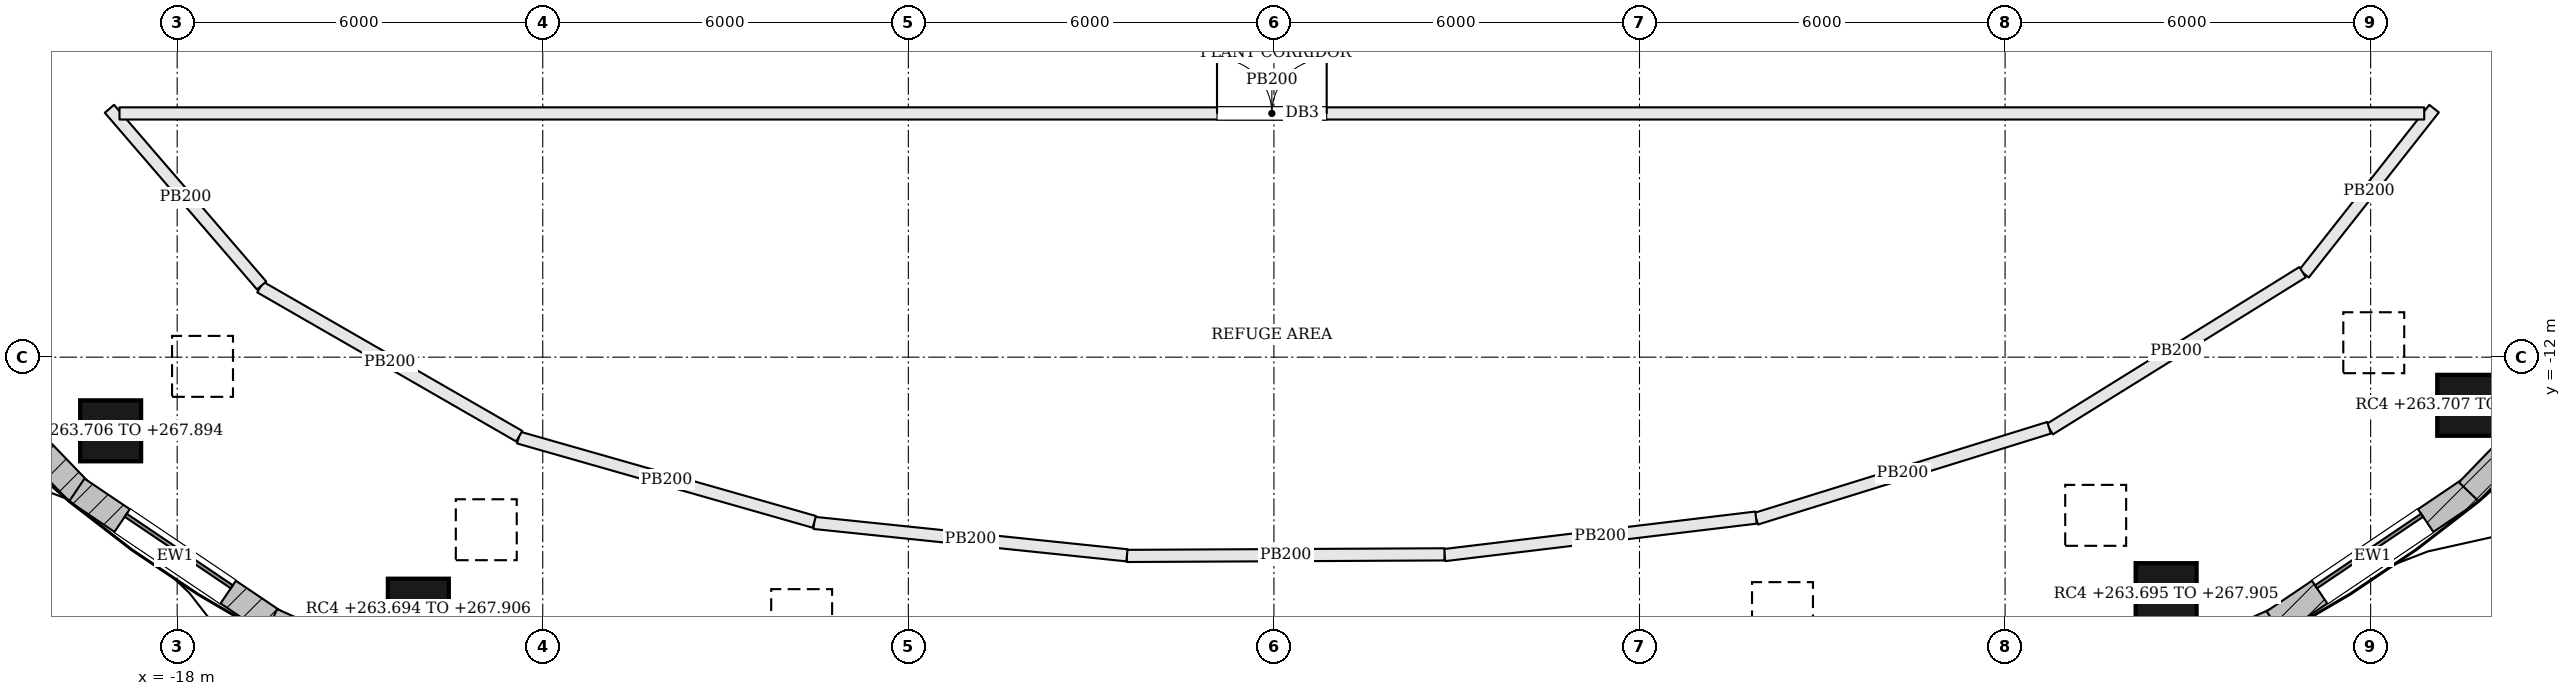
"""IFC4 building model, lengths in metres.
Left out: names, types, materials, properties, quantities, classifications, styles, units other than length and angle.
Written with IfcOpenShell. Run it as: python <this file> out.ifc"""

import sys

from ifc_helpers import new_model, si_unit, direction, frame, frame_2d, origin, origin_2d, place, context, subcontext, project, spatial, rectangle, extrude, element, fill, save


model = new_model("IFC4")
c1 = context("Model", 3, precision=1e-05, world=origin(), true_north=direction((0.0, 1.0)))
c2 = subcontext(c1, "Body", "Model", "MODEL_VIEW")
j1 = project(units=[si_unit("LENGTHUNIT", "METRE"), si_unit("PLANEANGLEUNIT", "RADIAN")], contexts=[c1])
p1 = place(None, origin())
s1 = spatial("IfcSite", under=j1, at=p1, CompositionType="ELEMENT")
p2 = place(p1, origin())
s2 = spatial("IfcBuilding", under=s1, at=p2, CompositionType="ELEMENT")
p3 = place(p2, frame((0.0, 0.0, 264.3)))
s3 = spatial("IfcBuildingStorey", under=s2, at=p3, CompositionType="ELEMENT", Elevation=264.3)
p4 = place(p3, frame((-19.092, -13.209, -0.594), z_axis=(0.329610632582, 0.231266388475, 0.915353859691), x_axis=(-0.574360318683, 0.818602604639, 0.0)))
e1 = element("IfcColumn", 1, at=p4, inside=s3, PredefinedType="COLUMN", context=c2, shape_type="SweptSolid", body=[
    extrude(rectangle(XDim=1.0, YDim=1.0, at=origin_2d()), origin(), (0.0, 0.0, 1.0), 4.575),
])
p5 = place(p3, frame((-14.042, -16.136, -0.606), z_axis=(0.245164009976, 0.286713592573, 0.926115502541), x_axis=(-0.760029513811, 0.649888558243, 0.0)))
e2 = element("IfcColumn", 2, at=p5, inside=s3, PredefinedType="COLUMN", context=c2, shape_type="SweptSolid", body=[
    extrude(rectangle(XDim=1.0, YDim=1.0, at=origin_2d()), origin(), (0.0, 0.0, 1.0), 4.548),
])
p6 = place(p3, frame((-8.422, -17.749, -0.619), z_axis=(0.148262587168, 0.318583885924, 0.936227810352), x_axis=(-0.906629641713, 0.421927354845, 0.0)))
e3 = element("IfcColumn", 3, at=p6, inside=s3, PredefinedType="COLUMN", context=c2, shape_type="SweptSolid", body=[
    extrude(rectangle(XDim=1.0, YDim=1.0, at=origin_2d()), origin(), (0.0, 0.0, 1.0), 4.527),
])
p7 = place(p3, frame((9.063, -17.625, -0.618), z_axis=(-0.158109970508, 0.316435570024, 0.93534473177), x_axis=(-0.89454907246, -0.446969749493, 0.0)))
e4 = element("IfcColumn", 4, at=p7, inside=s3, PredefinedType="COLUMN", context=c2, shape_type="SweptSolid", body=[
    extrude(rectangle(XDim=1.0, YDim=1.0, at=origin_2d()), origin(), (0.0, 0.0, 1.0), 4.529),
])
p8 = place(p3, frame((14.643, -15.881, -0.605), z_axis=(-0.254010498473, 0.282388862505, 0.925059564027), x_axis=(-0.743476713513, -0.66876182342, 0.0)))
e5 = element("IfcColumn", 5, at=p8, inside=s3, PredefinedType="COLUMN", context=c2, shape_type="SweptSolid", body=[
    extrude(rectangle(XDim=1.0, YDim=1.0, at=origin_2d()), origin(), (0.0, 0.0, 1.0), 4.551),
])
p9 = place(p3, frame((19.593, -12.79, -0.593), z_axis=(-0.336846855875, 0.224369018789, 0.914435749025), x_axis=(-0.554365652735, -0.832273226211, 0.0)))
e6 = element("IfcColumn", 6, at=p9, inside=s3, PredefinedType="COLUMN", context=c2, shape_type="SweptSolid", body=[
    extrude(rectangle(XDim=1.0, YDim=1.0, at=origin_2d()), origin(), (0.0, 0.0, 1.0), 4.578),
])
p10 = place(p3, frame((-22.386, -11.333, 0.0), z_axis=(0.0, 0.0, 1.0), x_axis=(0.694225992979, -0.719757091436, 0.0)))
e7 = element("IfcWall", 7, at=p10, inside=s3, PredefinedType="SOLIDWALL", context=c2, shape_type="SweptSolid", body=[
    extrude(rectangle(XDim=3.997, YDim=0.45, at=frame_2d((1.999, 0.0))), origin(), (0.0, 0.0, 1.0), 4.3),
])
p11 = place(p10, frame((0.948, 0.0, 1.2)))
e8 = element("IfcOpeningElement", 8, at=p11, cuts=e7, PredefinedType="OPENING", context=c2, shape_type="SweptSolid", body=[
    extrude(rectangle(XDim=2.1, YDim=1.8, at=frame_2d((1.05, 0.9))), frame((0.0, 0.235, 0.0), z_axis=(0.0, -1.0, 0.0), x_axis=(1.0, 0.0, 0.0)), (0.0, 0.0, 1.0), 0.47),
])
p12 = place(p3, frame((-19.647, -14.179, 0.0), z_axis=(0.0, 0.0, 1.0), x_axis=(0.829039015156, -0.559190764721, 0.0)))
e9 = element("IfcWall", 9, at=p12, inside=s3, PredefinedType="SOLIDWALL", context=c2, shape_type="SweptSolid", body=[
    extrude(rectangle(XDim=3.895, YDim=0.45, at=frame_2d((1.947, 0.0))), origin(), (0.0, 0.0, 1.0), 4.3),
])
p13 = place(p12, frame((0.897, 0.0, 1.2)))
e10 = element("IfcOpeningElement", 10, at=p13, cuts=e9, PredefinedType="OPENING", context=c2, shape_type="SweptSolid", body=[
    extrude(rectangle(XDim=2.1, YDim=1.8, at=frame_2d((1.05, 0.9))), frame((0.0, 0.235, 0.0), z_axis=(0.0, -1.0, 0.0), x_axis=(1.0, 0.0, 0.0)), (0.0, 0.0, 1.0), 0.47),
])
p14 = place(p3, frame((-16.452, -16.339, 0.0), z_axis=(0.0, 0.0, 1.0), x_axis=(0.912495881005, -0.409085892142, 0.0)))
e11 = element("IfcWall", 11, at=p14, inside=s3, PredefinedType="SOLIDWALL", context=c2, shape_type="SweptSolid", body=[
    extrude(rectangle(XDim=3.74, YDim=0.45, at=frame_2d((1.87, 0.0))), origin(), (0.0, 0.0, 1.0), 4.3),
])
p15 = place(p14, frame((0.82, 0.0, 1.2)))
e12 = element("IfcOpeningElement", 12, at=p15, cuts=e11, PredefinedType="OPENING", context=c2, shape_type="SweptSolid", body=[
    extrude(rectangle(XDim=2.1, YDim=1.8, at=frame_2d((1.05, 0.9))), frame((0.0, 0.235, 0.0), z_axis=(0.0, -1.0, 0.0), x_axis=(1.0, 0.0, 0.0)), (0.0, 0.0, 1.0), 0.47),
])
p16 = place(p3, frame((13.039, -17.869, 0.0), z_axis=(0.0, 0.0, 1.0), x_axis=(0.912495881005, 0.409085892142, 0.0)))
e13 = element("IfcWall", 13, at=p16, inside=s3, PredefinedType="SOLIDWALL", context=c2, shape_type="SweptSolid", body=[
    extrude(rectangle(XDim=3.74, YDim=0.45, at=frame_2d((1.87, 0.0))), origin(), (0.0, 0.0, 1.0), 4.3),
])
p17 = place(p16, frame((0.82, 0.0, 1.2)))
e14 = element("IfcOpeningElement", 14, at=p17, cuts=e13, PredefinedType="OPENING", context=c2, shape_type="SweptSolid", body=[
    extrude(rectangle(XDim=2.1, YDim=1.8, at=frame_2d((1.05, 0.9))), frame((0.0, 0.235, 0.0), z_axis=(0.0, -1.0, 0.0), x_axis=(1.0, 0.0, 0.0)), (0.0, 0.0, 1.0), 0.47),
])
p18 = place(p3, frame((16.418, -16.357, 0.0), z_axis=(0.0, 0.0, 1.0), x_axis=(0.829039015156, 0.559190764721, 0.0)))
e15 = element("IfcWall", 15, at=p18, inside=s3, PredefinedType="SOLIDWALL", context=c2, shape_type="SweptSolid", body=[
    extrude(rectangle(XDim=3.895, YDim=0.45, at=frame_2d((1.947, 0.0))), origin(), (0.0, 0.0, 1.0), 4.3),
])
p19 = place(p18, frame((0.897, 0.0, 1.2)))
e16 = element("IfcOpeningElement", 16, at=p19, cuts=e15, PredefinedType="OPENING", context=c2, shape_type="SweptSolid", body=[
    extrude(rectangle(XDim=2.1, YDim=1.8, at=frame_2d((1.05, 0.9))), frame((0.0, 0.235, 0.0), z_axis=(0.0, -1.0, 0.0), x_axis=(1.0, 0.0, 0.0)), (0.0, 0.0, 1.0), 0.47),
])
p20 = place(p3, frame((19.611, -14.21, 0.0), z_axis=(0.0, 0.0, 1.0), x_axis=(0.694225992979, 0.719757091436, 0.0)))
e17 = element("IfcWall", 17, at=p20, inside=s3, PredefinedType="SOLIDWALL", context=c2, shape_type="SweptSolid", body=[
    extrude(rectangle(XDim=3.997, YDim=0.45, at=frame_2d((1.999, 0.0))), origin(), (0.0, 0.0, 1.0), 4.3),
])
p21 = place(p20, frame((0.948, 0.0, 1.2)))
e18 = element("IfcOpeningElement", 18, at=p21, cuts=e17, PredefinedType="OPENING", context=c2, shape_type="SweptSolid", body=[
    extrude(rectangle(XDim=2.1, YDim=1.8, at=frame_2d((1.05, 0.9))), frame((0.0, 0.235, 0.0), z_axis=(0.0, -1.0, 0.0), x_axis=(1.0, 0.0, 0.0)), (0.0, 0.0, 1.0), 0.47),
])
p22 = place(p3, frame((19.041, -7.921, 0.0), z_axis=(0.0, 0.0, 1.0), x_axis=(-0.618817980567, -0.785534408493, 0.0)))
e19 = element("IfcWall", 19, at=p22, inside=s3, PredefinedType="PARTITIONING", context=c2, shape_type="SweptSolid", body=[
    extrude(rectangle(XDim=3.45, YDim=0.2, at=frame_2d((1.725, 0.0))), origin(), (0.0, 0.0, 1.0), 4.3),
])
p23 = place(p3, frame((16.883, -10.605, 0.0), z_axis=(0.0, 0.0, 1.0), x_axis=(-0.849608511022, -0.527413858368, 0.0)))
e20 = element("IfcWall", 20, at=p23, inside=s3, PredefinedType="PARTITIONING", context=c2, shape_type="SweptSolid", body=[
    extrude(rectangle(XDim=4.886, YDim=0.2, at=frame_2d((2.443, 0.0))), origin(), (0.0, 0.0, 1.0), 4.3),
])
p24 = place(p3, frame((12.721, -13.159, 0.0), z_axis=(0.0, 0.0, 1.0), x_axis=(-0.955038559717, -0.296481617396, 0.0)))
e21 = element("IfcWall", 21, at=p24, inside=s3, PredefinedType="PARTITIONING", context=c2, shape_type="SweptSolid", body=[
    extrude(rectangle(XDim=5.032, YDim=0.2, at=frame_2d((2.516, 0.0))), origin(), (0.0, 0.0, 1.0), 4.3),
])
p25 = place(p3, frame((7.912, -14.633, 0.0), z_axis=(0.0, 0.0, 1.0), x_axis=(-0.992841344803, -0.119440629808, 0.0)))
e22 = element("IfcWall", 22, at=p25, inside=s3, PredefinedType="PARTITIONING", context=c2, shape_type="SweptSolid", body=[
    extrude(rectangle(XDim=5.149, YDim=0.2, at=frame_2d((2.574, 0.0))), origin(), (0.0, 0.0, 1.0), 4.3),
])
p26 = place(p3, frame((2.799, -15.236, 0.0), z_axis=(0.0, 0.0, 1.0), x_axis=(-0.9999876741, -0.004965042553, 0.0)))
e23 = element("IfcWall", 23, at=p26, inside=s3, PredefinedType="PARTITIONING", context=c2, shape_type="SweptSolid", body=[
    extrude(rectangle(XDim=5.212, YDim=0.2, at=frame_2d((2.606, 0.0))), origin(), (0.0, 0.0, 1.0), 4.3),
])
p27 = place(p3, frame((-2.412, -15.252, 0.0), z_axis=(0.0, 0.0, 1.0), x_axis=(-0.994673915242, 0.103071830955, 0.0)))
e24 = element("IfcWall", 24, at=p27, inside=s3, PredefinedType="PARTITIONING", context=c2, shape_type="SweptSolid", body=[
    extrude(rectangle(XDim=5.161, YDim=0.2, at=frame_2d((2.581, 0.0))), origin(), (0.0, 0.0, 1.0), 4.3),
])
p28 = place(p3, frame((-7.543, -14.703, 0.0), z_axis=(0.0, 0.0, 1.0), x_axis=(-0.961706339668, 0.27408195169, 0.0)))
e25 = element("IfcWall", 25, at=p28, inside=s3, PredefinedType="PARTITIONING", context=c2, shape_type="SweptSolid", body=[
    extrude(rectangle(XDim=5.045, YDim=0.2, at=frame_2d((2.522, 0.0))), origin(), (0.0, 0.0, 1.0), 4.3),
])
p29 = place(p3, frame((-12.386, -13.297, 0.0), z_axis=(0.0, 0.0, 1.0), x_axis=(-0.866617890559, 0.498972375751, 0.0)))
e26 = element("IfcWall", 26, at=p29, inside=s3, PredefinedType="PARTITIONING", context=c2, shape_type="SweptSolid", body=[
    extrude(rectangle(XDim=4.904, YDim=0.2, at=frame_2d((2.452, 0.0))), origin(), (0.0, 0.0, 1.0), 4.3),
])
p30 = place(p3, frame((-16.614, -10.824, 0.0), z_axis=(0.0, 0.0, 1.0), x_axis=(-0.652659458067, 0.757651391998, 0.0)))
e27 = element("IfcWall", 27, at=p30, inside=s3, PredefinedType="PARTITIONING", context=c2, shape_type="SweptSolid", body=[
    extrude(rectangle(XDim=3.827, YDim=0.2, at=frame_2d((1.914, 0.0))), origin(), (0.0, 0.0, 1.0), 4.3),
])
p31 = place(p3, frame((-18.947, -8.0, 0.0), z_axis=(0.0, 0.0, 1.0), x_axis=(1.0, 0.0, 0.0)))
e28 = element("IfcWall", 28, at=p31, inside=s3, PredefinedType="PARTITIONING", context=c2, shape_type="SweptSolid", body=[
    extrude(rectangle(XDim=37.826, YDim=0.2, at=frame_2d((18.913, 0.0))), origin(), (0.0, 0.0, 1.0), 4.3),
])
p32 = place(p31, frame((18.013, 0.0, 0.0)))
e29 = element("IfcOpeningElement", 29, at=p32, cuts=e28, PredefinedType="OPENING", context=c2, shape_type="SweptSolid", body=[
    extrude(rectangle(XDim=1.8, YDim=2.1, at=frame_2d((0.9, 1.05))), frame((0.0, 0.11, 0.0), z_axis=(0.0, -1.0, 0.0), x_axis=(1.0, 0.0, 0.0)), (0.0, 0.0, 1.0), 0.22),
])
p33 = place(p13, origin())
e30 = element("IfcWindow", 30, at=p33, inside=s3, PartitioningType="SINGLE_PANEL", PredefinedType="WINDOW", context=c2, shape_type="SweptSolid", body=[
    extrude(rectangle(XDim=2.1, YDim=1.8, at=frame_2d((1.05, 0.9))), frame((0.0, 0.135, 0.0), z_axis=(0.0, -1.0, 0.0), x_axis=(1.0, 0.0, 0.0)), (0.0, 0.0, 1.0), 0.06),
])
fill(e10, e30)
p34 = place(p19, origin())
e31 = element("IfcWindow", 31, at=p34, inside=s3, PartitioningType="SINGLE_PANEL", PredefinedType="WINDOW", context=c2, shape_type="SweptSolid", body=[
    extrude(rectangle(XDim=2.1, YDim=1.8, at=frame_2d((1.05, 0.9))), frame((0.0, 0.135, 0.0), z_axis=(0.0, -1.0, 0.0), x_axis=(1.0, 0.0, 0.0)), (0.0, 0.0, 1.0), 0.06),
])
fill(e16, e31)
p35 = place(p32, origin())
e32 = element("IfcDoor", 32, at=p35, inside=s3, OperationType="DOUBLE_DOOR_SINGLE_SWING", PredefinedType="DOOR", context=c2, shape_type="SweptSolid", body=[
    extrude(rectangle(XDim=1.8, YDim=2.1, at=frame_2d((0.9, 1.05))), frame((0.0, 0.025, 0.0), z_axis=(0.0, -1.0, 0.0), x_axis=(1.0, 0.0, 0.0)), (0.0, 0.0, 1.0), 0.05),
])
fill(e29, e32)
save(model, sys.argv[1])
